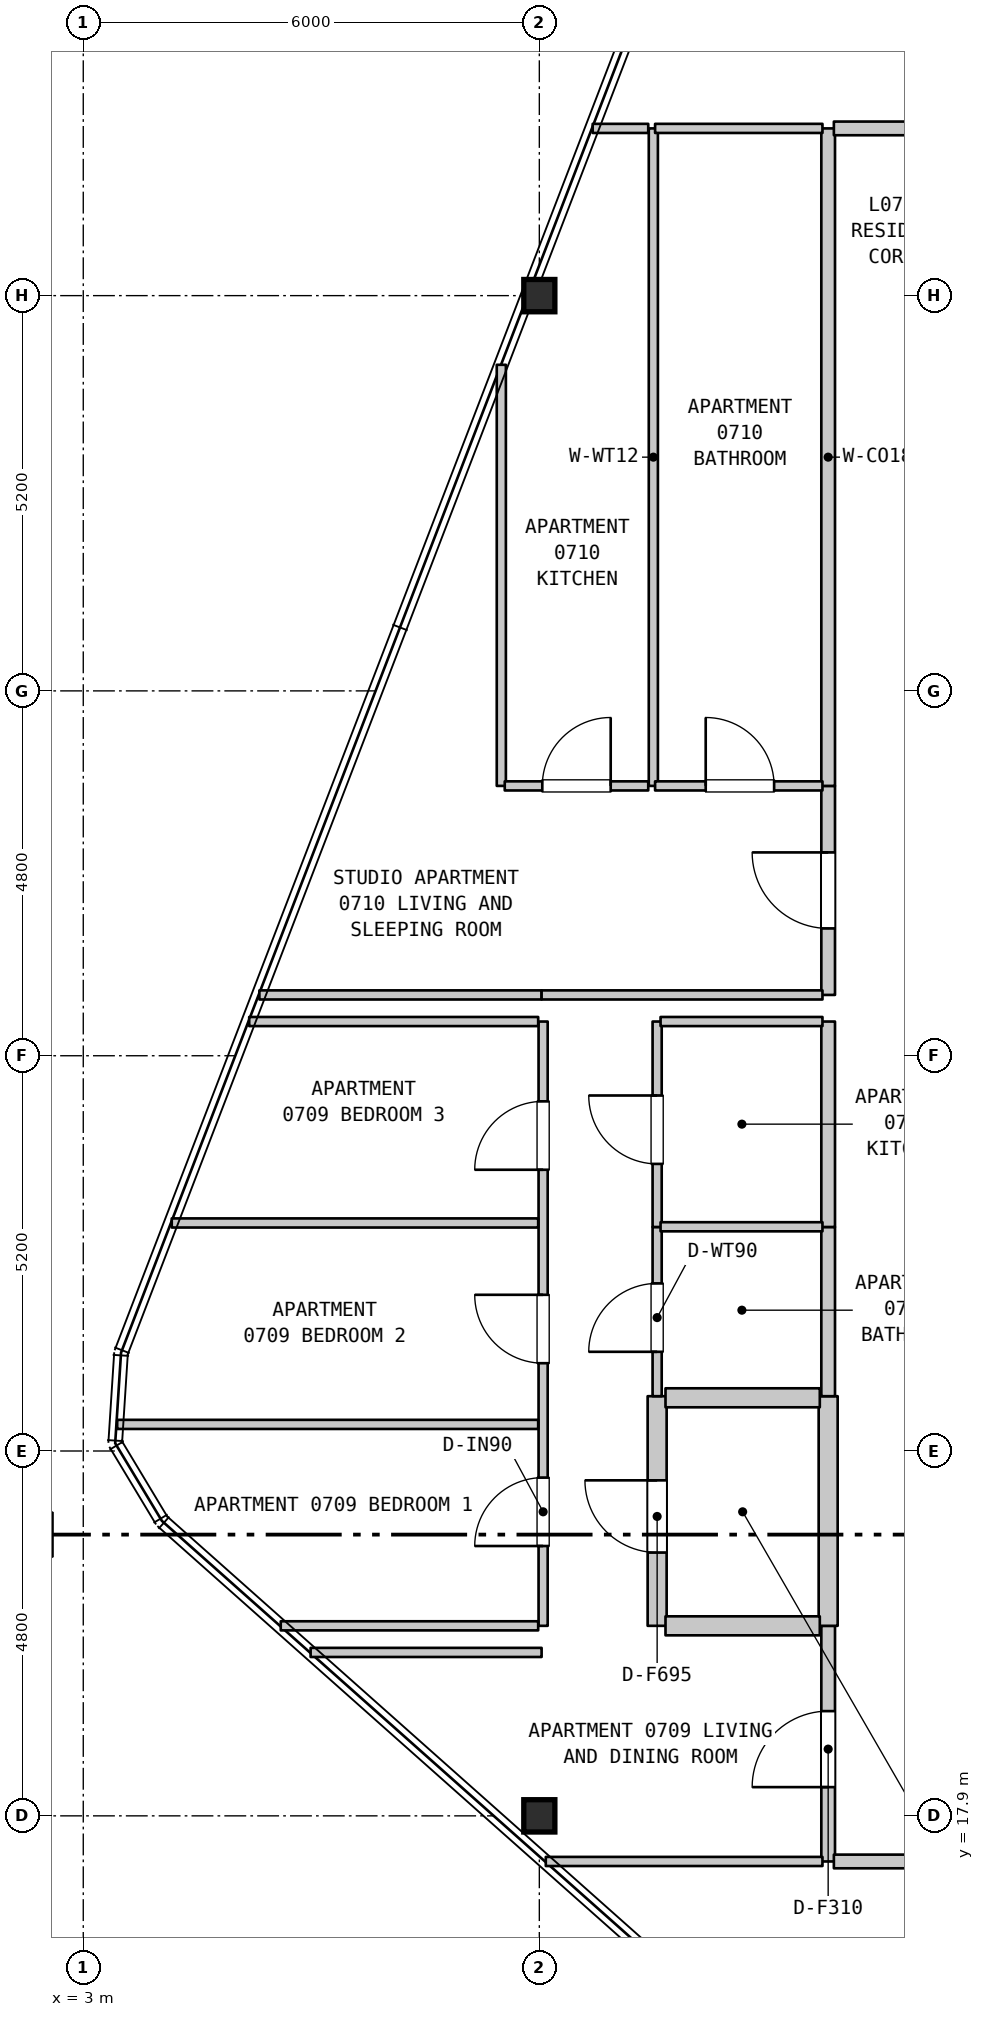
"""IFC4 building model, lengths in metres.
Left out: names, types, materials, properties, quantities, classifications, styles, units other than length and angle.
Written with IfcOpenShell. Run it as: python <this file> out.ifc"""

import sys

from ifc_helpers import new_model, si_unit, direction, frame, frame_2d, origin, origin_2d, place, context, subcontext, project, spatial, rectangle, i_section, extrude, element, fill, save


model = new_model("IFC4")
c1 = context("Model", 3, precision=1e-05, world=origin(), true_north=direction((0.0, 1.0)))
c2 = subcontext(c1, "Body", "Model", "MODEL_VIEW")
j1 = project(units=[si_unit("LENGTHUNIT", "METRE"), si_unit("PLANEANGLEUNIT", "RADIAN")], contexts=[c1])
p1 = place(None, origin())
s1 = spatial("IfcSite", under=j1, at=p1, CompositionType="ELEMENT")
p2 = place(p1, origin())
s2 = spatial("IfcBuilding", under=s1, at=p2, CompositionType="ELEMENT")
p3 = place(p2, frame((0.0, 0.0, 35.1)))
s3 = spatial("IfcBuildingStorey", under=s2, at=p3, CompositionType="ELEMENT", Elevation=35.1)
for number, where, z_axis, x_axis in (
    (1, (9.0, 17.9, 0.0), (0.0, 0.0, 1.0), (1.0, 0.0, 0.0)),
    (2, (9.0, 37.9, 0.0), (0.0, 0.0, 1.0), (1.0, 0.0, 0.0)),
):
    element("IfcColumn", number, at=place(p3, frame(where, z_axis=z_axis, x_axis=x_axis)), inside=s3, PredefinedType="COLUMN", context=c2, shape_type="SweptSolid", body=[
        extrude(i_section(OverallWidth=0.409, OverallDepth=0.425, WebThickness=0.032, FlangeThickness=0.052, FilletRadius=0.015, at=origin_2d()), origin(), (0.0, 0.0, 1.0), 3.7),
    ])
p4 = place(p3, frame((8.5, 31.45, 0.0), z_axis=(0.0, 0.0, 1.0), x_axis=(0.0, 1.0, 0.0)))
e3 = element("IfcWall", 3, at=p4, inside=s3, PredefinedType="PARTITIONING", context=c2, shape_type="SweptSolid", body=[
    extrude(rectangle(XDim=5.54, YDim=0.12, at=frame_2d((2.77, 0.0))), origin(), (0.0, 0.0, 1.0), 3.385),
])
p5 = place(p3, frame((9.05, 20.4, 0.0), z_axis=(0.0, 0.0, 1.0), x_axis=(0.0, 1.0, 0.0)))
e4 = element("IfcWall", 4, at=p5, inside=s3, PredefinedType="PARTITIONING", context=c2, shape_type="SweptSolid", body=[
    extrude(rectangle(XDim=7.95, YDim=0.12, at=frame_2d((3.975, 0.0))), origin(), (0.0, 0.0, 1.0), 2.785),
])
p6 = place(p5, frame((1.05, 0.0, 0.0)))
e5 = element("IfcOpeningElement", 5, at=p6, cuts=e4, PredefinedType="OPENING", context=c2, shape_type="SweptSolid", body=[
    extrude(rectangle(XDim=0.9, YDim=2.15, at=frame_2d((0.45, 1.075))), frame((0.0, 0.07, 0.0), z_axis=(0.0, -1.0, 0.0), x_axis=(1.0, 0.0, 0.0)), (0.0, 0.0, 1.0), 0.14),
])
p7 = place(p5, frame((3.455, 0.0, 0.0)))
e6 = element("IfcOpeningElement", 6, at=p7, cuts=e4, PredefinedType="OPENING", context=c2, shape_type="SweptSolid", body=[
    extrude(rectangle(XDim=0.9, YDim=2.15, at=frame_2d((0.45, 1.075))), frame((0.0, 0.07, 0.0), z_axis=(0.0, -1.0, 0.0), x_axis=(1.0, 0.0, 0.0)), (0.0, 0.0, 1.0), 0.14),
])
p8 = place(p5, frame((6.0, 0.0, 0.0)))
e7 = element("IfcOpeningElement", 7, at=p8, cuts=e4, PredefinedType="OPENING", context=c2, shape_type="SweptSolid", body=[
    extrude(rectangle(XDim=0.9, YDim=2.15, at=frame_2d((0.45, 1.075))), frame((0.0, 0.07, 0.0), z_axis=(0.0, -1.0, 0.0), x_axis=(1.0, 0.0, 0.0)), (0.0, 0.0, 1.0), 0.14),
])
p9 = place(p3, frame((10.5, 31.45, 0.0), z_axis=(0.0, 0.0, 1.0), x_axis=(0.0, 1.0, 0.0)))
e8 = element("IfcWall", 8, at=p9, inside=s3, PredefinedType="PARTITIONING", context=c2, shape_type="SweptSolid", body=[
    extrude(rectangle(XDim=8.65, YDim=0.12, at=frame_2d((4.325, 0.0))), origin(), (0.0, 0.0, 1.0), 3.385),
])
p10 = place(p3, frame((10.55, 20.4, 0.0), z_axis=(0.0, 0.0, 1.0), x_axis=(0.0, 1.0, 0.0)))
e9 = element("IfcWall", 9, at=p10, inside=s3, PredefinedType="STANDARD", context=c2, shape_type="SweptSolid", body=[
    extrude(rectangle(XDim=3.021, YDim=0.25, at=frame_2d((1.51, 0.0))), origin(), (0.0, 0.0, 1.0), 3.385),
])
p11 = place(p10, frame((0.964, 0.0, 0.0)))
e10 = element("IfcOpeningElement", 10, at=p11, cuts=e9, PredefinedType="OPENING", context=c2, shape_type="SweptSolid", body=[
    extrude(rectangle(XDim=0.95, YDim=2.15, at=frame_2d((0.475, 1.075))), frame((0.0, 0.135, 0.0), z_axis=(0.0, -1.0, 0.0), x_axis=(1.0, 0.0, 0.0)), (0.0, 0.0, 1.0), 0.27),
])
p12 = place(p3, frame((10.55, 23.421, 0.0), z_axis=(0.0, 0.0, 1.0), x_axis=(0.0, 1.0, 0.0)))
e11 = element("IfcWall", 11, at=p12, inside=s3, PredefinedType="PARTITIONING", context=c2, shape_type="SweptSolid", body=[
    extrude(rectangle(XDim=2.226, YDim=0.12, at=frame_2d((1.113, 0.0))), origin(), (0.0, 0.0, 1.0), 3.385),
])
p13 = place(p12, frame((0.584, 0.0, 0.0)))
e12 = element("IfcOpeningElement", 12, at=p13, cuts=e11, PredefinedType="OPENING", context=c2, shape_type="SweptSolid", body=[
    extrude(rectangle(XDim=0.9, YDim=2.1, at=frame_2d((0.45, 1.05))), frame((0.0, 0.07, 0.0), z_axis=(0.0, -1.0, 0.0), x_axis=(1.0, 0.0, 0.0)), (0.0, 0.0, 1.0), 0.14),
])
p14 = place(p3, frame((10.55, 25.647, 0.0), z_axis=(0.0, 0.0, 1.0), x_axis=(0.0, 1.0, 0.0)))
e13 = element("IfcWall", 13, at=p14, inside=s3, PredefinedType="PARTITIONING", context=c2, shape_type="SweptSolid", body=[
    extrude(rectangle(XDim=2.703, YDim=0.12, at=frame_2d((1.352, 0.0))), origin(), (0.0, 0.0, 1.0), 3.385),
])
p15 = place(p14, frame((0.83, 0.0, 0.0)))
e14 = element("IfcOpeningElement", 14, at=p15, cuts=e13, PredefinedType="OPENING", context=c2, shape_type="SweptSolid", body=[
    extrude(rectangle(XDim=0.9, YDim=2.15, at=frame_2d((0.45, 1.075))), frame((0.0, 0.07, 0.0), z_axis=(0.0, -1.0, 0.0), x_axis=(1.0, 0.0, 0.0)), (0.0, 0.0, 1.0), 0.14),
])
p16 = place(p3, frame((12.8, 17.3, 0.0), z_axis=(0.0, 0.0, 1.0), x_axis=(0.0, 1.0, 0.0)))
e15 = element("IfcWall", 15, at=p16, inside=s3, PredefinedType="STANDARD", context=c2, shape_type="SweptSolid", body=[
    extrude(rectangle(XDim=3.1, YDim=0.18, at=frame_2d((1.55, 0.0))), origin(), (0.0, 0.0, 1.0), 3.385),
])
p17 = place(p16, frame((0.978, 0.0, 0.0)))
e16 = element("IfcOpeningElement", 16, at=p17, cuts=e15, PredefinedType="OPENING", context=c2, shape_type="SweptSolid", body=[
    extrude(rectangle(XDim=1.0, YDim=2.15, at=frame_2d((0.5, 1.075))), frame((0.0, 0.1, 0.0), z_axis=(0.0, -1.0, 0.0), x_axis=(1.0, 0.0, 0.0)), (0.0, 0.0, 1.0), 0.2),
])
p18 = place(p3, frame((12.8, 20.4, 0.0), z_axis=(0.0, 0.0, 1.0), x_axis=(0.0, 1.0, 0.0)))
e17 = element("IfcWall", 17, at=p18, inside=s3, PredefinedType="STANDARD", context=c2, shape_type="SweptSolid", body=[
    extrude(rectangle(XDim=3.021, YDim=0.25, at=frame_2d((1.51, 0.0))), origin(), (0.0, 0.0, 1.0), 3.385),
])
p19 = place(p3, frame((12.8, 23.421, 0.0), z_axis=(0.0, 0.0, 1.0), x_axis=(0.0, 1.0, 0.0)))
e18 = element("IfcWall", 18, at=p19, inside=s3, PredefinedType="STANDARD", context=c2, shape_type="SweptSolid", body=[
    extrude(rectangle(XDim=2.226, YDim=0.18, at=frame_2d((1.113, 0.0))), origin(), (0.0, 0.0, 1.0), 3.385),
])
p20 = place(p3, frame((12.8, 25.647, 0.0), z_axis=(0.0, 0.0, 1.0), x_axis=(0.0, 1.0, 0.0)))
e19 = element("IfcWall", 19, at=p20, inside=s3, PredefinedType="STANDARD", context=c2, shape_type="SweptSolid", body=[
    extrude(rectangle(XDim=2.703, YDim=0.18, at=frame_2d((1.352, 0.0))), origin(), (0.0, 0.0, 1.0), 3.385),
])
p21 = place(p3, frame((12.8, 28.7, 0.0), z_axis=(0.0, 0.0, 1.0), x_axis=(0.0, 1.0, 0.0)))
e20 = element("IfcWall", 20, at=p21, inside=s3, PredefinedType="STANDARD", context=c2, shape_type="SweptSolid", body=[
    extrude(rectangle(XDim=2.75, YDim=0.18, at=frame_2d((1.375, 0.0))), origin(), (0.0, 0.0, 1.0), 3.385),
])
p22 = place(p21, frame((0.875, 0.0, 0.0)))
e21 = element("IfcOpeningElement", 21, at=p22, cuts=e20, PredefinedType="OPENING", context=c2, shape_type="SweptSolid", body=[
    extrude(rectangle(XDim=1.0, YDim=2.15, at=frame_2d((0.5, 1.075))), frame((0.0, 0.1, 0.0), z_axis=(0.0, -1.0, 0.0), x_axis=(1.0, 0.0, 0.0)), (0.0, 0.0, 1.0), 0.2),
])
p23 = place(p3, frame((12.8, 31.45, 0.0), z_axis=(0.0, 0.0, 1.0), x_axis=(0.0, 1.0, 0.0)))
e22 = element("IfcWall", 22, at=p23, inside=s3, PredefinedType="STANDARD", context=c2, shape_type="SweptSolid", body=[
    extrude(rectangle(XDim=8.65, YDim=0.18, at=frame_2d((4.325, 0.0))), origin(), (0.0, 0.0, 1.0), 3.385),
])
p24 = place(p3, frame((9.085, 17.3, 0.0), z_axis=(0.0, 0.0, 1.0), x_axis=(1.0, 0.0, 0.0)))
e23 = element("IfcWall", 23, at=p24, inside=s3, PredefinedType="PARTITIONING", context=c2, shape_type="SweptSolid", body=[
    extrude(rectangle(XDim=3.64, YDim=0.12, at=frame_2d((1.82, 0.0))), origin(), (0.0, 0.0, 1.0), 3.385),
])
p25 = place(p3, frame((12.875, 17.3, 0.0), z_axis=(0.0, 0.0, 1.0), x_axis=(1.0, 0.0, 0.0)))
e24 = element("IfcWall", 24, at=p25, inside=s3, PredefinedType="STANDARD", context=c2, shape_type="SweptSolid", body=[
    extrude(rectangle(XDim=5.72, YDim=0.18, at=frame_2d((2.86, 0.0))), origin(), (0.0, 0.0, 1.0), 3.385),
])
p26 = place(p25, frame((2.975, 0.0, 0.0)))
e25 = element("IfcOpeningElement", 25, at=p26, cuts=e24, PredefinedType="OPENING", context=c2, shape_type="SweptSolid", body=[
    extrude(rectangle(XDim=1.0, YDim=2.15, at=frame_2d((0.5, 1.075))), frame((0.0, 0.1, 0.0), z_axis=(0.0, -1.0, 0.0), x_axis=(1.0, 0.0, 0.0)), (0.0, 0.0, 1.0), 0.2),
])
p27 = place(p3, frame((5.991, 20.05, 0.0), z_axis=(0.0, 0.0, 1.0), x_axis=(1.0, 0.0, 0.0)))
e26 = element("IfcWall", 26, at=p27, inside=s3, PredefinedType="PARTITIONING", context=c2, shape_type="SweptSolid", body=[
    extrude(rectangle(XDim=3.039, YDim=0.12, at=frame_2d((1.52, 0.0))), origin(), (0.0, 0.0, 1.0), 3.385),
])
p28 = place(p3, frame((5.598, 20.4, 0.0), z_axis=(0.0, 0.0, 1.0), x_axis=(1.0, 0.0, 0.0)))
e27 = element("IfcWall", 27, at=p28, inside=s3, PredefinedType="PARTITIONING", context=c2, shape_type="SweptSolid", body=[
    extrude(rectangle(XDim=3.387, YDim=0.12, at=frame_2d((1.694, 0.0))), origin(), (0.0, 0.0, 1.0), 3.385),
])
p29 = place(p3, frame((10.66, 20.4, 0.0), z_axis=(0.0, 0.0, 1.0), x_axis=(1.0, 0.0, 0.0)))
e28 = element("IfcWall", 28, at=p29, inside=s3, PredefinedType="STANDARD", context=c2, shape_type="SweptSolid", body=[
    extrude(rectangle(XDim=2.03, YDim=0.25, at=frame_2d((1.015, 0.0))), origin(), (0.0, 0.0, 1.0), 3.385),
])
p30 = place(p3, frame((3.446, 23.05, 0.0), z_axis=(0.0, 0.0, 1.0), x_axis=(1.0, 0.0, 0.0)))
e29 = element("IfcWall", 29, at=p30, inside=s3, PredefinedType="PARTITIONING", context=c2, shape_type="SweptSolid", body=[
    extrude(rectangle(XDim=5.539, YDim=0.12, at=frame_2d((2.77, 0.0))), origin(), (0.0, 0.0, 1.0), 3.385),
])
p31 = place(p3, frame((10.66, 23.4, 0.0), z_axis=(0.0, 0.0, 1.0), x_axis=(1.0, 0.0, 0.0)))
e30 = element("IfcWall", 30, at=p31, inside=s3, PredefinedType="STANDARD", context=c2, shape_type="SweptSolid", body=[
    extrude(rectangle(XDim=2.03, YDim=0.25, at=frame_2d((1.015, 0.0))), origin(), (0.0, 0.0, 1.0), 3.385),
])
p32 = place(p3, frame((10.595, 25.65, 0.0), z_axis=(0.0, 0.0, 1.0), x_axis=(1.0, 0.0, 0.0)))
e31 = element("IfcWall", 31, at=p32, inside=s3, PredefinedType="PARTITIONING", context=c2, shape_type="SweptSolid", body=[
    extrude(rectangle(XDim=2.13, YDim=0.12, at=frame_2d((1.065, 0.0))), origin(), (0.0, 0.0, 1.0), 3.385),
])
p33 = place(p3, frame((4.164, 25.7, 0.0), z_axis=(0.0, 0.0, 1.0), x_axis=(1.0, 0.0, 0.0)))
e32 = element("IfcWall", 32, at=p33, inside=s3, PredefinedType="PARTITIONING", context=c2, shape_type="SweptSolid", body=[
    extrude(rectangle(XDim=4.821, YDim=0.12, at=frame_2d((2.411, 0.0))), origin(), (0.0, 0.0, 1.0), 3.385),
])
p34 = place(p3, frame((5.183, 28.35, 0.0), z_axis=(0.0, 0.0, 1.0), x_axis=(1.0, 0.0, 0.0)))
e33 = element("IfcWall", 33, at=p34, inside=s3, PredefinedType="PARTITIONING", context=c2, shape_type="SweptSolid", body=[
    extrude(rectangle(XDim=3.802, YDim=0.12, at=frame_2d((1.901, 0.0))), origin(), (0.0, 0.0, 1.0), 3.385),
])
p35 = place(p3, frame((10.595, 28.35, 0.0), z_axis=(0.0, 0.0, 1.0), x_axis=(1.0, 0.0, 0.0)))
e34 = element("IfcWall", 34, at=p35, inside=s3, PredefinedType="PARTITIONING", context=c2, shape_type="SweptSolid", body=[
    extrude(rectangle(XDim=2.13, YDim=0.12, at=frame_2d((1.065, 0.0))), origin(), (0.0, 0.0, 1.0), 3.385),
])
p36 = place(p3, frame((5.317, 28.7, 0.0), z_axis=(0.0, 0.0, 1.0), x_axis=(1.0, 0.0, 0.0)))
e35 = element("IfcWall", 35, at=p36, inside=s3, PredefinedType="PARTITIONING", context=c2, shape_type="SweptSolid", body=[
    extrude(rectangle(XDim=3.713, YDim=0.12, at=frame_2d((1.856, 0.0))), origin(), (0.0, 0.0, 1.0), 3.385),
])
p37 = place(p3, frame((9.03, 28.7, 0.0), z_axis=(0.0, 0.0, 1.0), x_axis=(1.0, 0.0, 0.0)))
e36 = element("IfcWall", 36, at=p37, inside=s3, PredefinedType="PARTITIONING", context=c2, shape_type="SweptSolid", body=[
    extrude(rectangle(XDim=3.695, YDim=0.12, at=frame_2d((1.848, 0.0))), origin(), (0.0, 0.0, 1.0), 3.385),
])
p38 = place(p3, frame((8.545, 31.45, 0.0), z_axis=(0.0, 0.0, 1.0), x_axis=(1.0, 0.0, 0.0)))
e37 = element("IfcWall", 37, at=p38, inside=s3, PredefinedType="PARTITIONING", context=c2, shape_type="SweptSolid", body=[
    extrude(rectangle(XDim=1.888, YDim=0.12, at=frame_2d((0.944, 0.0))), origin(), (0.0, 0.0, 1.0), 3.385),
])
p39 = place(p38, frame((0.494, 0.0, 0.0)))
e38 = element("IfcOpeningElement", 38, at=p39, cuts=e37, PredefinedType="OPENING", context=c2, shape_type="SweptSolid", body=[
    extrude(rectangle(XDim=0.9, YDim=2.15, at=frame_2d((0.45, 1.075))), frame((0.0, 0.07, 0.0), z_axis=(0.0, -1.0, 0.0), x_axis=(1.0, 0.0, 0.0)), (0.0, 0.0, 1.0), 0.14),
])
p40 = place(p3, frame((10.523, 31.45, 0.0), z_axis=(0.0, 0.0, 1.0), x_axis=(1.0, 0.0, 0.0)))
e39 = element("IfcWall", 39, at=p40, inside=s3, PredefinedType="PARTITIONING", context=c2, shape_type="SweptSolid", body=[
    extrude(rectangle(XDim=2.202, YDim=0.12, at=frame_2d((1.101, 0.0))), origin(), (0.0, 0.0, 1.0), 3.385),
])
p41 = place(p40, frame((0.666, 0.0, 0.0)))
e40 = element("IfcOpeningElement", 40, at=p41, cuts=e39, PredefinedType="OPENING", context=c2, shape_type="SweptSolid", body=[
    extrude(rectangle(XDim=0.9, YDim=2.1, at=frame_2d((0.45, 1.05))), frame((0.0, 0.07, 0.0), z_axis=(0.0, -1.0, 0.0), x_axis=(1.0, 0.0, 0.0)), (0.0, 0.0, 1.0), 0.14),
])
p42 = place(p3, frame((9.702, 40.1, 0.0), z_axis=(0.0, 0.0, 1.0), x_axis=(1.0, 0.0, 0.0)))
e41 = element("IfcWall", 41, at=p42, inside=s3, PredefinedType="PARTITIONING", context=c2, shape_type="SweptSolid", body=[
    extrude(rectangle(XDim=0.731, YDim=0.12, at=frame_2d((0.366, 0.0))), origin(), (0.0, 0.0, 1.0), 3.385),
])
p43 = place(p3, frame((10.523, 40.1, 0.0), z_axis=(0.0, 0.0, 1.0), x_axis=(1.0, 0.0, 0.0)))
e42 = element("IfcWall", 42, at=p43, inside=s3, PredefinedType="PARTITIONING", context=c2, shape_type="SweptSolid", body=[
    extrude(rectangle(XDim=2.202, YDim=0.12, at=frame_2d((1.101, 0.0))), origin(), (0.0, 0.0, 1.0), 3.385),
])
p44 = place(p3, frame((12.875, 40.1, 0.0), z_axis=(0.0, 0.0, 1.0), x_axis=(1.0, 0.0, 0.0)))
e43 = element("IfcWall", 43, at=p44, inside=s3, PredefinedType="STANDARD", context=c2, shape_type="SweptSolid", body=[
    extrude(rectangle(XDim=5.59, YDim=0.18, at=frame_2d((2.795, 0.0))), origin(), (0.0, 0.0, 1.0), 3.385),
])
p45 = place(p44, frame((2.28, 0.0, 0.0)))
e44 = element("IfcOpeningElement", 44, at=p45, cuts=e43, PredefinedType="OPENING", context=c2, shape_type="SweptSolid", body=[
    extrude(rectangle(XDim=1.0, YDim=2.15, at=frame_2d((0.5, 1.075))), frame((0.0, 0.1, 0.0), z_axis=(0.0, -1.0, 0.0), x_axis=(1.0, 0.0, 0.0)), (0.0, 0.0, 1.0), 0.2),
])
p46 = place(p6, origin())
e45 = element("IfcDoor", 45, at=p46, inside=s3, OperationType="SINGLE_SWING_LEFT", PredefinedType="DOOR", context=c2, shape_type="SweptSolid", body=[
    extrude(rectangle(XDim=0.9, YDim=2.15, at=frame_2d((0.45, 1.075))), frame((0.0, 0.025, 0.0), z_axis=(0.0, -1.0, 0.0), x_axis=(1.0, 0.0, 0.0)), (0.0, 0.0, 1.0), 0.05),
])
fill(e5, e45)
p47 = place(p7, origin())
e46 = element("IfcDoor", 46, at=p47, inside=s3, OperationType="SINGLE_SWING_RIGHT", PredefinedType="DOOR", context=c2, shape_type="SweptSolid", body=[
    extrude(rectangle(XDim=0.9, YDim=2.15, at=frame_2d((0.45, 1.075))), frame((0.0, 0.025, 0.0), z_axis=(0.0, -1.0, 0.0), x_axis=(1.0, 0.0, 0.0)), (0.0, 0.0, 1.0), 0.05),
])
fill(e6, e46)
p48 = place(p8, origin())
e47 = element("IfcDoor", 47, at=p48, inside=s3, OperationType="SINGLE_SWING_LEFT", PredefinedType="DOOR", context=c2, shape_type="SweptSolid", body=[
    extrude(rectangle(XDim=0.9, YDim=2.15, at=frame_2d((0.45, 1.075))), frame((0.0, 0.025, 0.0), z_axis=(0.0, -1.0, 0.0), x_axis=(1.0, 0.0, 0.0)), (0.0, 0.0, 1.0), 0.05),
])
fill(e7, e47)
p49 = place(p11, origin())
e48 = element("IfcDoor", 48, at=p49, inside=s3, OperationType="SINGLE_SWING_RIGHT", PredefinedType="DOOR", context=c2, shape_type="SweptSolid", body=[
    extrude(rectangle(XDim=0.95, YDim=2.15, at=frame_2d((0.475, 1.075))), frame((0.0, 0.025, 0.0), z_axis=(0.0, -1.0, 0.0), x_axis=(1.0, 0.0, 0.0)), (0.0, 0.0, 1.0), 0.05),
])
fill(e10, e48)
p50 = place(p13, origin())
e49 = element("IfcDoor", 49, at=p50, inside=s3, OperationType="SINGLE_SWING_LEFT", PredefinedType="DOOR", context=c2, shape_type="SweptSolid", body=[
    extrude(rectangle(XDim=0.9, YDim=2.1, at=frame_2d((0.45, 1.05))), frame((0.0, 0.025, 0.0), z_axis=(0.0, -1.0, 0.0), x_axis=(1.0, 0.0, 0.0)), (0.0, 0.0, 1.0), 0.05),
])
fill(e12, e49)
p51 = place(p15, origin())
e50 = element("IfcDoor", 50, at=p51, inside=s3, OperationType="SINGLE_SWING_RIGHT", PredefinedType="DOOR", context=c2, shape_type="SweptSolid", body=[
    extrude(rectangle(XDim=0.9, YDim=2.15, at=frame_2d((0.45, 1.075))), frame((0.0, 0.025, 0.0), z_axis=(0.0, -1.0, 0.0), x_axis=(1.0, 0.0, 0.0)), (0.0, 0.0, 1.0), 0.05),
])
fill(e14, e50)
p52 = place(p17, origin())
e51 = element("IfcDoor", 51, at=p52, inside=s3, OperationType="SINGLE_SWING_LEFT", PredefinedType="DOOR", context=c2, shape_type="SweptSolid", body=[
    extrude(rectangle(XDim=1.0, YDim=2.15, at=frame_2d((0.5, 1.075))), frame((0.0, 0.025, 0.0), z_axis=(0.0, -1.0, 0.0), x_axis=(1.0, 0.0, 0.0)), (0.0, 0.0, 1.0), 0.05),
])
fill(e16, e51)
p53 = place(p22, origin())
e52 = element("IfcDoor", 52, at=p53, inside=s3, OperationType="SINGLE_SWING_RIGHT", PredefinedType="DOOR", context=c2, shape_type="SweptSolid", body=[
    extrude(rectangle(XDim=1.0, YDim=2.15, at=frame_2d((0.5, 1.075))), frame((0.0, 0.025, 0.0), z_axis=(0.0, -1.0, 0.0), x_axis=(1.0, 0.0, 0.0)), (0.0, 0.0, 1.0), 0.05),
])
fill(e21, e52)
p54 = place(p39, origin())
e53 = element("IfcDoor", 53, at=p54, inside=s3, OperationType="SINGLE_SWING_RIGHT", PredefinedType="DOOR", context=c2, shape_type="SweptSolid", body=[
    extrude(rectangle(XDim=0.9, YDim=2.15, at=frame_2d((0.45, 1.075))), frame((0.0, 0.025, 0.0), z_axis=(0.0, -1.0, 0.0), x_axis=(1.0, 0.0, 0.0)), (0.0, 0.0, 1.0), 0.05),
])
fill(e38, e53)
p55 = place(p41, origin())
e54 = element("IfcDoor", 54, at=p55, inside=s3, OperationType="SINGLE_SWING_LEFT", PredefinedType="DOOR", context=c2, shape_type="SweptSolid", body=[
    extrude(rectangle(XDim=0.9, YDim=2.1, at=frame_2d((0.45, 1.05))), frame((0.0, 0.025, 0.0), z_axis=(0.0, -1.0, 0.0), x_axis=(1.0, 0.0, 0.0)), (0.0, 0.0, 1.0), 0.05),
])
fill(e40, e54)
save(model, sys.argv[1])
